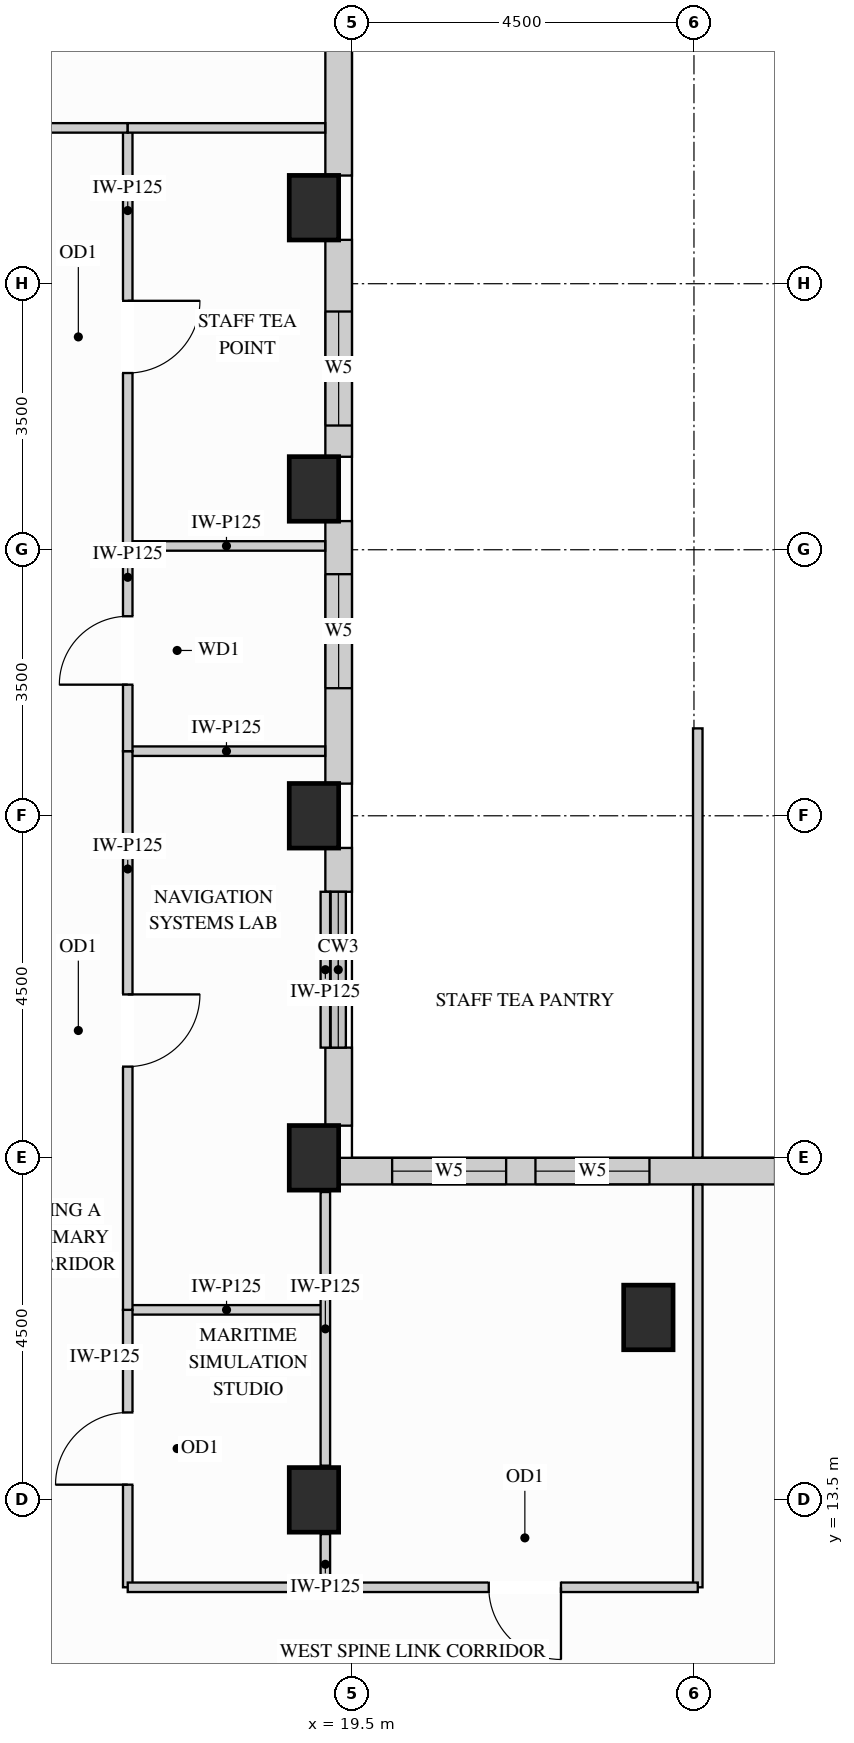
"""IFC4 building model, lengths in metres.
Left out: names, types, materials, properties, quantities, classifications, styles, units other than length and angle.
Written with IfcOpenShell. Run it as: python <this file> out.ifc"""

import sys

from ifc_helpers import new_model, si_unit, direction, frame, frame_2d, origin, origin_2d, place, context, subcontext, project, spatial, rectangle, extrude, source, transform, mapped, element, fill, save


model = new_model("IFC4")
c1 = context("Model", 3, precision=1e-05, world=origin(), true_north=direction((0.0, 1.0)))
c2 = subcontext(c1, "Body", "Model", "MODEL_VIEW")
j1 = project(units=[si_unit("LENGTHUNIT", "METRE"), si_unit("PLANEANGLEUNIT", "RADIAN")], contexts=[c1])
p1 = place(None, origin())
s1 = spatial("IfcSite", under=j1, at=p1, CompositionType="ELEMENT")
p2 = place(p1, origin())
s2 = spatial("IfcBuilding", under=s1, at=p2, CompositionType="ELEMENT")
p3 = place(p2, frame((0.0, 0.0, 212.4)))
s3 = spatial("IfcBuildingStorey", under=s2, at=p3, CompositionType="ELEMENT", Elevation=212.4)
m1 = source(origin(), c2, "Body", "SweptSolid", [
    extrude(rectangle(XDim=0.65, YDim=0.85, at=origin_2d()), origin(), (0.0, 0.0, 1.0), 3.4),
])
for number, where, z_axis, x_axis in (
    (1, (19.0, 13.5, 0.0), (0.0, 0.0, 1.0), (1.0, 0.0, 0.0)),
    (2, (19.0, 18.0, 0.0), (0.0, 0.0, 1.0), (1.0, 0.0, 0.0)),
    (3, (19.0, 22.5, 0.0), (0.0, 0.0, 1.0), (1.0, 0.0, 0.0)),
    (4, (19.0, 26.8, 0.0), (0.0, 0.0, 1.0), (1.0, 0.0, 0.0)),
    (5, (19.0, 30.5, 0.0), (0.0, 0.0, 1.0), (1.0, 0.0, 0.0)),
    (6, (23.4, 15.9, 0.0), (0.0, 0.0, 1.0), (1.0, 0.0, 0.0)),
):
    element("IfcColumn", number, at=place(p3, frame(where, z_axis=z_axis, x_axis=x_axis)), inside=s3, PredefinedType="COLUMN", context=c2, shape_type="MappedRepresentation", body=[
        mapped(m1, transform((0.0, 0.0, 0.0), x_axis=(1.0, 0.0, 0.0), y_axis=(0.0, 1.0, 0.0), z_axis=(0.0, 0.0, 1.0))),
    ])
p4 = place(p3, frame((34.577, 17.825, 0.0), z_axis=(0.0, 0.0, 1.0), x_axis=(-1.0, 0.0, 0.0)))
e7 = element("IfcWall", 7, at=p4, inside=s3, PredefinedType="SOLIDWALL", context=c2, shape_type="SweptSolid", body=[
    extrude(rectangle(XDim=15.254, YDim=0.35, at=frame_2d((7.627, 0.0))), origin(), (0.0, 0.0, 1.0), 3.385),
])
p5 = place(p4, frame((0.706, 0.0, 0.78)))
e8 = element("IfcOpeningElement", 8, at=p5, cuts=e7, PredefinedType="OPENING", context=c2, shape_type="SweptSolid", body=[
    extrude(rectangle(XDim=1.5, YDim=2.0, at=frame_2d((0.75, 1.0))), frame((0.0, 0.185, 0.0), z_axis=(0.0, -1.0, 0.0), x_axis=(1.0, 0.0, 0.0)), (0.0, 0.0, 1.0), 0.37),
])
p6 = place(p4, frame((2.591, 0.0, 0.78)))
e9 = element("IfcOpeningElement", 9, at=p6, cuts=e7, PredefinedType="OPENING", context=c2, shape_type="SweptSolid", body=[
    extrude(rectangle(XDim=1.5, YDim=2.0, at=frame_2d((0.75, 1.0))), frame((0.0, 0.185, 0.0), z_axis=(0.0, -1.0, 0.0), x_axis=(1.0, 0.0, 0.0)), (0.0, 0.0, 1.0), 0.37),
])
p7 = place(p4, frame((5.744, 0.0, 0.78)))
e10 = element("IfcOpeningElement", 10, at=p7, cuts=e7, PredefinedType="OPENING", context=c2, shape_type="SweptSolid", body=[
    extrude(rectangle(XDim=1.5, YDim=2.0, at=frame_2d((0.75, 1.0))), frame((0.0, 0.185, 0.0), z_axis=(0.0, -1.0, 0.0), x_axis=(1.0, 0.0, 0.0)), (0.0, 0.0, 1.0), 0.37),
])
p8 = place(p4, frame((8.01, 0.0, 0.78)))
e11 = element("IfcOpeningElement", 11, at=p8, cuts=e7, PredefinedType="OPENING", context=c2, shape_type="SweptSolid", body=[
    extrude(rectangle(XDim=1.5, YDim=2.0, at=frame_2d((0.75, 1.0))), frame((0.0, 0.185, 0.0), z_axis=(0.0, -1.0, 0.0), x_axis=(1.0, 0.0, 0.0)), (0.0, 0.0, 1.0), 0.37),
])
p9 = place(p4, frame((11.163, 0.0, 0.78)))
e12 = element("IfcOpeningElement", 12, at=p9, cuts=e7, PredefinedType="OPENING", context=c2, shape_type="SweptSolid", body=[
    extrude(rectangle(XDim=1.5, YDim=2.0, at=frame_2d((0.75, 1.0))), frame((0.0, 0.185, 0.0), z_axis=(0.0, -1.0, 0.0), x_axis=(1.0, 0.0, 0.0)), (0.0, 0.0, 1.0), 0.37),
])
p10 = place(p4, frame((13.048, 0.0, 0.78)))
e13 = element("IfcOpeningElement", 13, at=p10, cuts=e7, PredefinedType="OPENING", context=c2, shape_type="SweptSolid", body=[
    extrude(rectangle(XDim=1.5, YDim=2.0, at=frame_2d((0.75, 1.0))), frame((0.0, 0.185, 0.0), z_axis=(0.0, -1.0, 0.0), x_axis=(1.0, 0.0, 0.0)), (0.0, 0.0, 1.0), 0.37),
])
m2 = source(origin(), c2, "Body", "SweptSolid", [
    extrude(rectangle(XDim=1.027, YDim=0.35, at=frame_2d((0.513, 0.0))), origin(), (0.0, 0.0, 1.0), 2.619),
])
p11 = place(p3, frame((19.325, 18.423, 0.0), z_axis=(0.0, 0.0, 1.0), x_axis=(0.0, 1.0, 0.0)))
e14 = element("IfcWall", 14, at=p11, inside=s3, PredefinedType="SOLIDWALL", context=c2, shape_type="MappedRepresentation", body=[
    mapped(m2, transform((0.0, 0.0, 0.0), x_axis=(1.0, 0.0, 0.0), y_axis=(0.0, 1.0, 0.0), z_axis=(0.0, 0.0, 1.0))),
])
m3 = source(origin(), c2, "Body", "SweptSolid", [
    extrude(rectangle(XDim=0.577, YDim=0.35, at=frame_2d((0.289, 0.0))), origin(), (0.0, 0.0, 1.0), 2.619),
])
p12 = place(p3, frame((19.325, 21.5, 0.0), z_axis=(0.0, 0.0, 1.0), x_axis=(0.0, 1.0, 0.0)))
e15 = element("IfcWall", 15, at=p12, inside=s3, PredefinedType="SOLIDWALL", context=c2, shape_type="MappedRepresentation", body=[
    mapped(m3, transform((0.0, 0.0, 0.0), x_axis=(1.0, 0.0, 0.0), y_axis=(0.0, 1.0, 0.0), z_axis=(0.0, 0.0, 1.0))),
])
p13 = place(p3, frame((19.325, 22.923, 0.0), z_axis=(0.0, 0.0, 1.0), x_axis=(0.0, 1.0, 0.0)))
e16 = element("IfcWall", 16, at=p13, inside=s3, PredefinedType="SOLIDWALL", context=c2, shape_type="SweptSolid", body=[
    extrude(rectangle(XDim=3.454, YDim=0.35, at=frame_2d((1.727, 0.0))), origin(), (0.0, 0.0, 1.0), 2.619),
])
p14 = place(p13, frame((1.256, 0.0, 0.78)))
e17 = element("IfcOpeningElement", 17, at=p14, cuts=e16, PredefinedType="OPENING", context=c2, shape_type="SweptSolid", body=[
    extrude(rectangle(XDim=1.5, YDim=1.659, at=frame_2d((0.75, 0.83))), frame((0.0, 0.185, 0.0), z_axis=(0.0, -1.0, 0.0), x_axis=(1.0, 0.0, 0.0)), (0.0, 0.0, 1.0), 0.37),
])
p15 = place(p3, frame((19.325, 27.223, 0.0), z_axis=(0.0, 0.0, 1.0), x_axis=(0.0, 1.0, 0.0)))
e18 = element("IfcWall", 18, at=p15, inside=s3, PredefinedType="SOLIDWALL", context=c2, shape_type="SweptSolid", body=[
    extrude(rectangle(XDim=2.854, YDim=0.35, at=frame_2d((1.427, 0.0))), origin(), (0.0, 0.0, 1.0), 2.619),
])
p16 = place(p15, frame((0.411, 0.0, 0.78)))
e19 = element("IfcOpeningElement", 19, at=p16, cuts=e18, PredefinedType="OPENING", context=c2, shape_type="SweptSolid", body=[
    extrude(rectangle(XDim=1.5, YDim=1.659, at=frame_2d((0.75, 0.83))), frame((0.0, 0.185, 0.0), z_axis=(0.0, -1.0, 0.0), x_axis=(1.0, 0.0, 0.0)), (0.0, 0.0, 1.0), 0.37),
])
m4 = source(origin(), c2, "Body", "SweptSolid", [
    extrude(rectangle(XDim=3.654, YDim=0.35, at=frame_2d((1.827, 0.0))), origin(), (0.0, 0.0, 1.0), 2.619),
])
p17 = place(p3, frame((19.325, 30.923, 0.0), z_axis=(0.0, 0.0, 1.0), x_axis=(0.0, 1.0, 0.0)))
e20 = element("IfcWall", 20, at=p17, inside=s3, PredefinedType="SOLIDWALL", context=c2, shape_type="MappedRepresentation", body=[
    mapped(m4, transform((0.0, 0.0, 0.0), x_axis=(1.0, 0.0, 0.0), y_axis=(0.0, 1.0, 0.0), z_axis=(0.0, 0.0, 1.0))),
])
m5 = source(origin(), c2, "Body", "SweptSolid", [
    extrude(rectangle(XDim=2.6, YDim=0.125, at=frame_2d((1.3, 0.0))), origin(), (0.0, 0.0, 1.0), 3.385),
])
p18 = place(p3, frame((16.55, 16.0, 0.0), z_axis=(0.0, 0.0, 1.0), x_axis=(1.0, 0.0, 0.0)))
e21 = element("IfcWall", 21, at=p18, inside=s3, PredefinedType="PARTITIONING", context=c2, shape_type="MappedRepresentation", body=[
    mapped(m5, transform((0.0, 0.0, 0.0), x_axis=(1.0, 0.0, 0.0), y_axis=(0.0, 1.0, 0.0), z_axis=(0.0, 0.0, 1.0))),
])
m6 = source(origin(), c2, "Body", "SweptSolid", [
    extrude(rectangle(XDim=2.598, YDim=0.125, at=frame_2d((1.299, 0.0))), origin(), (0.0, 0.0, 1.0), 3.385),
])
for number, where, z_axis, x_axis in (
    (22, (16.55, 23.35, 0.0), (0.0, 0.0, 1.0), (1.0, 0.0, 0.0)),
    (23, (16.55, 26.05, 0.0), (0.0, 0.0, 1.0), (1.0, 0.0, 0.0)),
):
    element("IfcWall", number, at=place(p3, frame(where, z_axis=z_axis, x_axis=x_axis)), inside=s3, PredefinedType="PARTITIONING", context=c2, shape_type="MappedRepresentation", body=[
        mapped(m6, transform((0.0, 0.0, 0.0), x_axis=(1.0, 0.0, 0.0), y_axis=(0.0, 1.0, 0.0), z_axis=(0.0, 0.0, 1.0))),
    ])
m7 = source(origin(), c2, "Body", "SweptSolid", [
    extrude(rectangle(XDim=0.7, YDim=0.125, at=frame_2d((0.35, 0.0))), origin(), (0.0, 0.0, 1.0), 2.773),
])
p19 = place(p3, frame((19.15, 12.35, 0.0), z_axis=(0.0, 0.0, 1.0), x_axis=(0.0, 1.0, 0.0)))
e24 = element("IfcWall", 24, at=p19, inside=s3, PredefinedType="PARTITIONING", context=c2, shape_type="MappedRepresentation", body=[
    mapped(m7, transform((0.0, 0.0, 0.0), x_axis=(1.0, 0.0, 0.0), y_axis=(0.0, 1.0, 0.0), z_axis=(0.0, 0.0, 1.0))),
])
m8 = source(origin(), c2, "Body", "SweptSolid", [
    extrude(rectangle(XDim=3.6, YDim=0.125, at=frame_2d((1.8, 0.0))), origin(), (0.0, 0.0, 1.0), 2.773),
])
p20 = place(p3, frame((19.15, 13.95, 0.0), z_axis=(0.0, 0.0, 1.0), x_axis=(0.0, 1.0, 0.0)))
e25 = element("IfcWall", 25, at=p20, inside=s3, PredefinedType="PARTITIONING", context=c2, shape_type="MappedRepresentation", body=[
    mapped(m8, transform((0.0, 0.0, 0.0), x_axis=(1.0, 0.0, 0.0), y_axis=(0.0, 1.0, 0.0), z_axis=(0.0, 0.0, 1.0))),
])
m9 = source(origin(), c2, "Body", "SweptSolid", [
    extrude(rectangle(XDim=2.05, YDim=0.125, at=frame_2d((1.025, 0.0))), origin(), (0.0, 0.0, 1.0), 2.619),
])
p21 = place(p3, frame((19.15, 19.45, 0.0), z_axis=(0.0, 0.0, 1.0), x_axis=(0.0, 1.0, 0.0)))
e26 = element("IfcWall", 26, at=p21, inside=s3, PredefinedType="PARTITIONING", context=c2, shape_type="MappedRepresentation", body=[
    mapped(m9, transform((0.0, 0.0, 0.0), x_axis=(1.0, 0.0, 0.0), y_axis=(0.0, 1.0, 0.0), z_axis=(0.0, 0.0, 1.0))),
])
p22 = place(p3, frame((16.55, 12.35, 0.0), z_axis=(0.0, 0.0, 1.0), x_axis=(0.0, 1.0, 0.0)))
e27 = element("IfcWall", 27, at=p22, inside=s3, PredefinedType="PARTITIONING", context=c2, shape_type="SweptSolid", body=[
    extrude(rectangle(XDim=3.65, YDim=0.125, at=frame_2d((1.825, 0.0))), origin(), (0.0, 0.0, 1.0), 3.385),
])
p23 = place(p22, frame((1.35, 0.0, 0.0)))
e28 = element("IfcOpeningElement", 28, at=p23, cuts=e27, PredefinedType="OPENING", context=c2, shape_type="SweptSolid", body=[
    extrude(rectangle(XDim=0.95, YDim=2.15, at=frame_2d((0.475, 1.075))), frame((0.0, 0.073, 0.0), z_axis=(0.0, -1.0, 0.0), x_axis=(1.0, 0.0, 0.0)), (0.0, 0.0, 1.0), 0.145),
])
p24 = place(p3, frame((16.55, 16.0, 0.0), z_axis=(0.0, 0.0, 1.0), x_axis=(0.0, 1.0, 0.0)))
e29 = element("IfcWall", 29, at=p24, inside=s3, PredefinedType="PARTITIONING", context=c2, shape_type="SweptSolid", body=[
    extrude(rectangle(XDim=7.35, YDim=0.125, at=frame_2d((3.675, 0.0))), origin(), (0.0, 0.0, 1.0), 3.385),
])
p25 = place(p24, frame((3.2, 0.0, 0.0)))
e30 = element("IfcOpeningElement", 30, at=p25, cuts=e29, PredefinedType="OPENING", context=c2, shape_type="SweptSolid", body=[
    extrude(rectangle(XDim=0.95, YDim=2.15, at=frame_2d((0.475, 1.075))), frame((0.0, 0.073, 0.0), z_axis=(0.0, -1.0, 0.0), x_axis=(1.0, 0.0, 0.0)), (0.0, 0.0, 1.0), 0.145),
])
p26 = place(p3, frame((16.55, 26.05, 0.0), z_axis=(0.0, 0.0, 1.0), x_axis=(0.0, 1.0, 0.0)))
e31 = element("IfcWall", 31, at=p26, inside=s3, PredefinedType="PARTITIONING", context=c2, shape_type="SweptSolid", body=[
    extrude(rectangle(XDim=5.5, YDim=0.125, at=frame_2d((2.75, 0.0))), origin(), (0.0, 0.0, 1.0), 3.385),
])
p27 = place(p26, frame((2.275, 0.0, 0.0)))
e32 = element("IfcOpeningElement", 32, at=p27, cuts=e31, PredefinedType="OPENING", context=c2, shape_type="SweptSolid", body=[
    extrude(rectangle(XDim=0.95, YDim=2.15, at=frame_2d((0.475, 1.075))), frame((0.0, 0.073, 0.0), z_axis=(0.0, -1.0, 0.0), x_axis=(1.0, 0.0, 0.0)), (0.0, 0.0, 1.0), 0.145),
])
p28 = place(p3, frame((16.55, 23.35, 0.0), z_axis=(0.0, 0.0, 1.0), x_axis=(0.0, 1.0, 0.0)))
e33 = element("IfcWall", 33, at=p28, inside=s3, PredefinedType="PARTITIONING", context=c2, shape_type="SweptSolid", body=[
    extrude(rectangle(XDim=2.7, YDim=0.125, at=frame_2d((1.35, 0.0))), origin(), (0.0, 0.0, 1.0), 3.385),
])
p29 = place(p28, frame((0.875, 0.0, 0.0)))
e34 = element("IfcOpeningElement", 34, at=p29, cuts=e33, PredefinedType="OPENING", context=c2, shape_type="SweptSolid", body=[
    extrude(rectangle(XDim=0.9, YDim=2.15, at=frame_2d((0.45, 1.075))), frame((0.0, 0.073, 0.0), z_axis=(0.0, -1.0, 0.0), x_axis=(1.0, 0.0, 0.0)), (0.0, 0.0, 1.0), 0.145),
])
p30 = place(p3, frame((2.45, 31.55, 0.0), z_axis=(0.0, 0.0, 1.0), x_axis=(1.0, 0.0, 0.0)))
e35 = element("IfcWall", 35, at=p30, inside=s3, PredefinedType="PARTITIONING", context=c2, shape_type="SweptSolid", body=[
    extrude(rectangle(XDim=14.1, YDim=0.125, at=frame_2d((7.05, 0.0))), origin(), (0.0, 0.0, 1.0), 3.385),
])
p31 = place(p30, frame((6.575, 0.0, 0.0)))
e36 = element("IfcOpeningElement", 36, at=p31, cuts=e35, PredefinedType="OPENING", context=c2, shape_type="SweptSolid", body=[
    extrude(rectangle(XDim=0.95, YDim=2.15, at=frame_2d((0.475, 1.075))), frame((0.0, 0.073, 0.0), z_axis=(0.0, -1.0, 0.0), x_axis=(1.0, 0.0, 0.0)), (0.0, 0.0, 1.0), 0.145),
])
p32 = place(p3, frame((16.55, 31.55, 0.0), z_axis=(0.0, 0.0, 1.0), x_axis=(1.0, 0.0, 0.0)))
e37 = element("IfcWall", 37, at=p32, inside=s3, PredefinedType="PARTITIONING", context=c2, shape_type="MappedRepresentation", body=[
    mapped(m6, transform((0.0, 0.0, 0.0), x_axis=(1.0, 0.0, 0.0), y_axis=(0.0, 1.0, 0.0), z_axis=(0.0, 0.0, 1.0))),
])
m10 = source(origin(), c2, "Body", "SweptSolid", [
    extrude(rectangle(XDim=5.298, YDim=0.125, at=frame_2d((2.649, 0.0))), origin(), (0.0, 0.0, 1.0), 3.385),
])
p33 = place(p3, frame((24.05, 12.35, 0.0), z_axis=(0.0, 0.0, 1.0), x_axis=(0.0, 1.0, 0.0)))
e38 = element("IfcWall", 38, at=p33, inside=s3, PredefinedType="PARTITIONING", context=c2, shape_type="MappedRepresentation", body=[
    mapped(m10, transform((0.0, 0.0, 0.0), x_axis=(1.0, 0.0, 0.0), y_axis=(0.0, 1.0, 0.0), z_axis=(0.0, 0.0, 1.0))),
])
m11 = source(origin(), c2, "Body", "SweptSolid", [
    extrude(rectangle(XDim=5.648, YDim=0.125, at=frame_2d((2.824, 0.0))), origin(), (0.0, 0.0, 1.0), 3.385),
])
p34 = place(p3, frame((24.05, 18.002, 0.0), z_axis=(0.0, 0.0, 1.0), x_axis=(0.0, 1.0, 0.0)))
e39 = element("IfcWall", 39, at=p34, inside=s3, PredefinedType="PARTITIONING", context=c2, shape_type="MappedRepresentation", body=[
    mapped(m11, transform((0.0, 0.0, 0.0), x_axis=(1.0, 0.0, 0.0), y_axis=(0.0, 1.0, 0.0), z_axis=(0.0, 0.0, 1.0))),
])
m12 = source(origin(), c2, "Body", "SweptSolid", [
    extrude(rectangle(XDim=2.95, YDim=0.125, at=frame_2d((1.475, 0.0))), origin(), (0.0, 0.0, 1.0), 3.385),
])
p35 = place(p3, frame((16.55, 12.35, 0.0), z_axis=(0.0, 0.0, 1.0), x_axis=(1.0, 0.0, 0.0)))
e40 = element("IfcWall", 40, at=p35, inside=s3, PredefinedType="PARTITIONING", context=c2, shape_type="MappedRepresentation", body=[
    mapped(m12, transform((0.0, 0.0, 0.0), x_axis=(1.0, 0.0, 0.0), y_axis=(0.0, 1.0, 0.0), z_axis=(0.0, 0.0, 1.0))),
])
p36 = place(p3, frame((19.5, 12.35, 0.0), z_axis=(0.0, 0.0, 1.0), x_axis=(1.0, 0.0, 0.0)))
e41 = element("IfcWall", 41, at=p36, inside=s3, PredefinedType="PARTITIONING", context=c2, shape_type="SweptSolid", body=[
    extrude(rectangle(XDim=4.55, YDim=0.125, at=frame_2d((2.275, 0.0))), origin(), (0.0, 0.0, 1.0), 3.385),
])
p37 = place(p36, frame((1.8, 0.0, 0.0)))
e42 = element("IfcOpeningElement", 42, at=p37, cuts=e41, PredefinedType="OPENING", context=c2, shape_type="SweptSolid", body=[
    extrude(rectangle(XDim=0.95, YDim=2.15, at=frame_2d((0.475, 1.075))), frame((0.0, 0.073, 0.0), z_axis=(0.0, -1.0, 0.0), x_axis=(1.0, 0.0, 0.0)), (0.0, 0.0, 1.0), 0.145),
])
m13 = source(origin(), c2, "Body", "SweptSolid", [
    extrude(rectangle(XDim=0.95, YDim=2.15, at=frame_2d((0.475, 1.075))), frame((0.0, 0.025, 0.0), z_axis=(0.0, -1.0, 0.0), x_axis=(1.0, 0.0, 0.0)), (0.0, 0.0, 1.0), 0.05),
])
p38 = place(p23, origin())
e43 = element("IfcDoor", 43, at=p38, inside=s3, OperationType="SINGLE_SWING_LEFT", PredefinedType="DOOR", context=c2, shape_type="MappedRepresentation", body=[
    mapped(m13, transform((0.0, 0.0, 0.0), x_axis=(1.0, 0.0, 0.0), y_axis=(0.0, 1.0, 0.0), z_axis=(0.0, 0.0, 1.0))),
])
fill(e28, e43)
p39 = place(p25, origin())
e44 = element("IfcDoor", 44, at=p39, inside=s3, OperationType="SINGLE_SWING_RIGHT", PredefinedType="DOOR", context=c2, shape_type="MappedRepresentation", body=[
    mapped(m13, transform((0.0, 0.0, 0.0), x_axis=(1.0, 0.0, 0.0), y_axis=(0.0, 1.0, 0.0), z_axis=(0.0, 0.0, 1.0))),
])
fill(e30, e44)
p40 = place(p27, origin())
e45 = element("IfcDoor", 45, at=p40, inside=s3, OperationType="SINGLE_SWING_RIGHT", PredefinedType="DOOR", context=c2, shape_type="MappedRepresentation", body=[
    mapped(m13, transform((0.0, 0.0, 0.0), x_axis=(1.0, 0.0, 0.0), y_axis=(0.0, 1.0, 0.0), z_axis=(0.0, 0.0, 1.0))),
])
fill(e32, e45)
p41 = place(p37, origin())
e46 = element("IfcDoor", 46, at=p41, inside=s3, OperationType="SINGLE_SWING_RIGHT", PredefinedType="DOOR", context=c2, shape_type="MappedRepresentation", body=[
    mapped(m13, transform((0.0, 0.0, 0.0), x_axis=(1.0, 0.0, 0.0), y_axis=(0.0, 1.0, 0.0), z_axis=(0.0, 0.0, 1.0))),
])
fill(e42, e46)
m14 = source(origin(), c2, "Body", "SweptSolid", [
    extrude(rectangle(XDim=0.9, YDim=2.15, at=frame_2d((0.45, 1.075))), frame((0.0, 0.025, 0.0), z_axis=(0.0, -1.0, 0.0), x_axis=(1.0, 0.0, 0.0)), (0.0, 0.0, 1.0), 0.05),
])
p42 = place(p29, origin())
e47 = element("IfcDoor", 47, at=p42, inside=s3, OperationType="SINGLE_SWING_LEFT", PredefinedType="DOOR", context=c2, shape_type="MappedRepresentation", body=[
    mapped(m14, transform((0.0, 0.0, 0.0), x_axis=(1.0, 0.0, 0.0), y_axis=(0.0, 1.0, 0.0), z_axis=(0.0, 0.0, 1.0))),
])
fill(e34, e47)
m15 = source(origin(), c2, "Body", "SweptSolid", [
    extrude(rectangle(XDim=1.5, YDim=2.0, at=frame_2d((0.75, 1.0))), frame((0.0, 0.03, 0.0), z_axis=(0.0, -1.0, 0.0), x_axis=(1.0, 0.0, 0.0)), (0.0, 0.0, 1.0), 0.06),
])
p43 = place(p9, origin())
e48 = element("IfcWindow", 48, at=p43, inside=s3, PartitioningType="SINGLE_PANEL", PredefinedType="WINDOW", context=c2, shape_type="MappedRepresentation", body=[
    mapped(m15, transform((0.0, 0.0, 0.0), x_axis=(1.0, 0.0, 0.0), y_axis=(0.0, 1.0, 0.0), z_axis=(0.0, 0.0, 1.0))),
])
fill(e12, e48)
p44 = place(p10, origin())
e49 = element("IfcWindow", 49, at=p44, inside=s3, PartitioningType="SINGLE_PANEL", PredefinedType="WINDOW", context=c2, shape_type="MappedRepresentation", body=[
    mapped(m15, transform((0.0, 0.0, 0.0), x_axis=(1.0, 0.0, 0.0), y_axis=(0.0, 1.0, 0.0), z_axis=(0.0, 0.0, 1.0))),
])
fill(e13, e49)
m16 = source(origin(), c2, "Body", "SweptSolid", [
    extrude(rectangle(XDim=1.5, YDim=1.659, at=frame_2d((0.75, 0.83))), frame((0.0, 0.03, 0.0), z_axis=(0.0, -1.0, 0.0), x_axis=(1.0, 0.0, 0.0)), (0.0, 0.0, 1.0), 0.06),
])
p45 = place(p14, origin())
e50 = element("IfcWindow", 50, at=p45, inside=s3, PartitioningType="SINGLE_PANEL", PredefinedType="WINDOW", context=c2, shape_type="MappedRepresentation", body=[
    mapped(m16, transform((0.0, 0.0, 0.0), x_axis=(1.0, 0.0, 0.0), y_axis=(0.0, 1.0, 0.0), z_axis=(0.0, 0.0, 1.0))),
])
fill(e17, e50)
p46 = place(p16, origin())
e51 = element("IfcWindow", 51, at=p46, inside=s3, PartitioningType="SINGLE_PANEL", PredefinedType="WINDOW", context=c2, shape_type="MappedRepresentation", body=[
    mapped(m16, transform((0.0, 0.0, 0.0), x_axis=(1.0, 0.0, 0.0), y_axis=(0.0, 1.0, 0.0), z_axis=(0.0, 0.0, 1.0))),
])
fill(e19, e51)
save(model, sys.argv[1])
